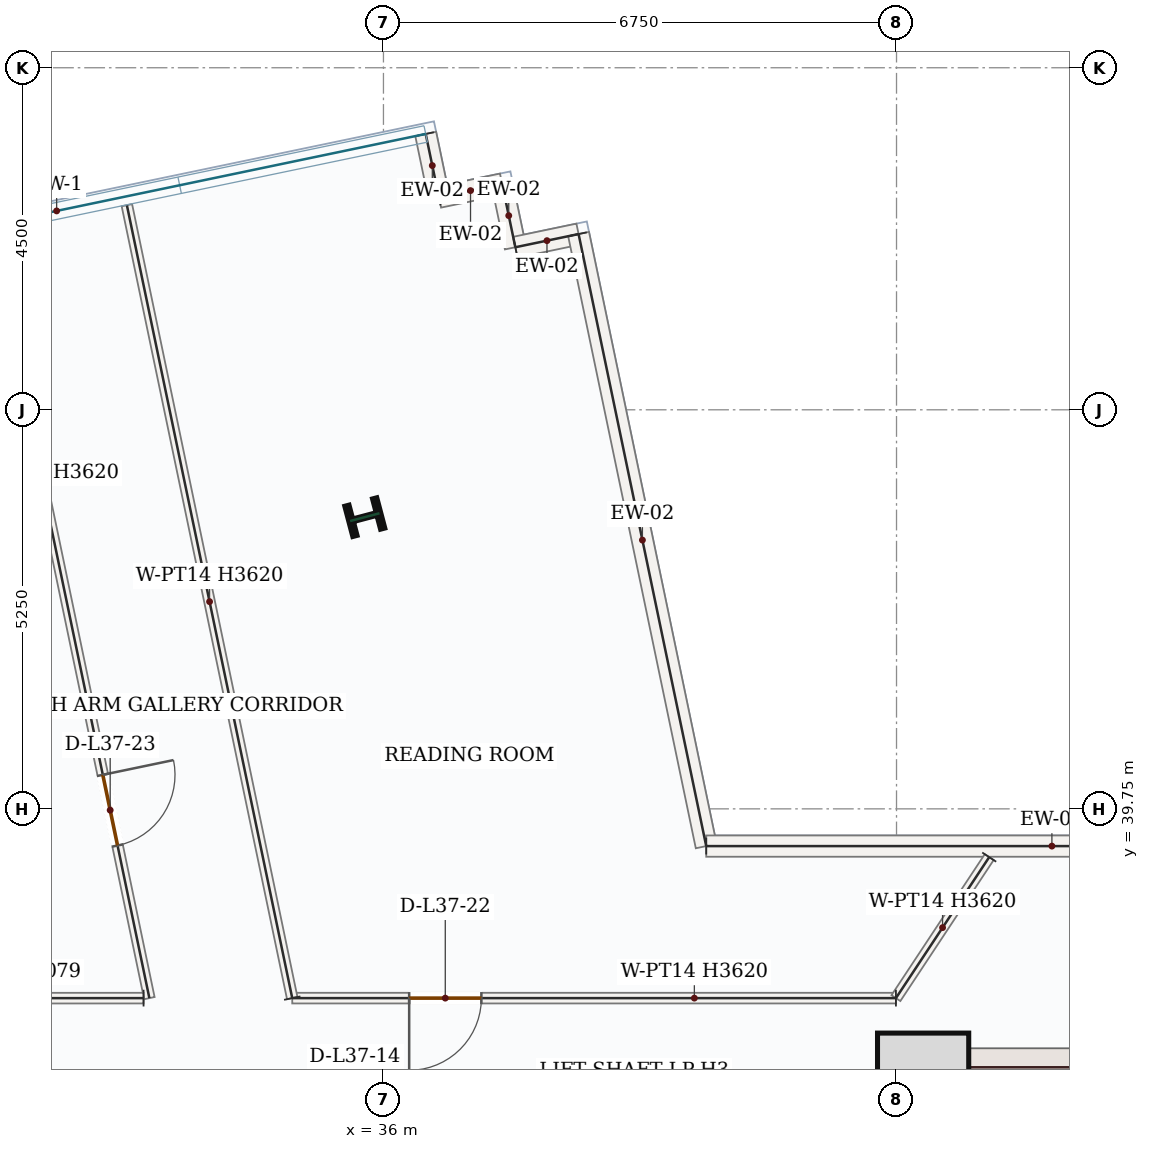
"""IFC4 building model, lengths in metres.
Left out: names, types, materials, properties, quantities, classifications, styles, units other than length and angle.
Written with IfcOpenShell. Run it as: python <this file> out.ifc"""

import sys

from ifc_helpers import new_model, si_unit, direction, frame, frame_2d, origin, origin_2d, place, context, subcontext, project, spatial, rectangle, i_section, extrude, source, transform, mapped, element, fill, save


model = new_model("IFC4")
c1 = context("Model", 3, precision=1e-05, world=origin(), true_north=direction((0.0, 1.0)))
c2 = subcontext(c1, "Body", "Model", "MODEL_VIEW")
j1 = project(units=[si_unit("LENGTHUNIT", "METRE"), si_unit("PLANEANGLEUNIT", "RADIAN")], contexts=[c1])
p1 = place(None, origin())
s1 = spatial("IfcSite", under=j1, at=p1, CompositionType="ELEMENT")
p2 = place(p1, origin())
s2 = spatial("IfcBuilding", under=s1, at=p2, CompositionType="ELEMENT")
p3 = place(p2, frame((0.0, 0.0, 162.9)))
s3 = spatial("IfcBuildingStorey", under=s2, at=p3, CompositionType="ELEMENT", Elevation=162.9)
p4 = place(p3, frame((43.0, 28.05, 0.0), z_axis=(0.0, 0.0, 1.0), x_axis=(0.0, 1.0, 0.0)))
e1 = element("IfcWall", 1, at=p4, inside=s3, PredefinedType="SHEAR", context=c2, shape_type="SweptSolid", body=[
    extrude(rectangle(XDim=8.55, YDim=0.5, at=frame_2d((4.275, 0.0))), origin(), (0.0, 0.0, 1.0), 3.62),
])
p5 = place(p4, frame((1.5, 0.0, 0.0)))
e2 = element("IfcOpeningElement", 2, at=p5, cuts=e1, PredefinedType="OPENING", context=c2, shape_type="SweptSolid", body=[
    extrude(rectangle(XDim=1.1, YDim=2.2, at=frame_2d((0.55, 1.1))), frame((0.0, 0.26, 0.0), z_axis=(0.0, -1.0, 0.0), x_axis=(1.0, 0.0, 0.0)), (0.0, 0.0, 1.0), 0.52),
])
m1 = source(origin(), c2, "Body", "SweptSolid", [
    extrude(rectangle(XDim=7.0, YDim=0.5, at=frame_2d((3.5, 0.0))), origin(), (0.0, 0.0, 1.0), 3.62),
])
p6 = place(p3, frame((43.25, 36.35, 0.0), z_axis=(0.0, 0.0, 1.0), x_axis=(1.0, 0.0, 0.0)))
e3 = element("IfcWall", 3, at=p6, inside=s3, PredefinedType="SHEAR", context=c2, shape_type="MappedRepresentation", body=[
    mapped(m1, transform((0.0, 0.0, 0.0), x_axis=(1.0, 0.0, 0.0), y_axis=(0.0, 1.0, 0.0), z_axis=(0.0, 0.0, 1.0), scale=1.0)),
])
m2 = source(origin(), c2, "Body", "SweptSolid", [
    extrude(rectangle(XDim=1.2, YDim=1.2, at=origin_2d()), origin(), (0.0, 0.0, 1.0), 3.9),
])
p7 = place(p3, frame((43.1, 36.2, 0.0), z_axis=(0.0, 0.0, 1.0), x_axis=(1.0, 0.0, 0.0)))
e4 = element("IfcColumn", 4, at=p7, inside=s3, PredefinedType="COLUMN", context=c2, shape_type="MappedRepresentation", body=[
    mapped(m2, transform((0.0, 0.0, 0.0), x_axis=(1.0, 0.0, 0.0), y_axis=(0.0, 1.0, 0.0), z_axis=(0.0, 0.0, 1.0), scale=1.0)),
])
m3 = source(origin(), c2, "Body", "SweptSolid", [
    extrude(i_section(OverallWidth=0.412, OverallDepth=0.435, WebThickness=0.036, FlangeThickness=0.057, FilletRadius=0.018, at=origin_2d()), origin(), (0.0, 0.0, 1.0), 3.9),
])
p8 = place(p3, frame((35.755, 43.588, 0.0), z_axis=(0.0, 0.0, 1.0), x_axis=(-0.255445757936, 0.966823388604, 0.0)))
e5 = element("IfcColumn", 5, at=p8, inside=s3, PredefinedType="COLUMN", context=c2, shape_type="MappedRepresentation", body=[
    mapped(m3, transform((0.0, 0.0, 0.0), x_axis=(1.0, 0.0, 0.0), y_axis=(0.0, 1.0, 0.0), z_axis=(0.0, 0.0, 1.0), scale=1.0)),
])
m4 = source(origin(), c2, "Body", "SweptSolid", [
    extrude(rectangle(XDim=0.85, YDim=0.28, at=frame_2d((0.425, 0.0))), origin(), (0.0, 0.0, 1.0), 3.62),
])
for number, where, z_axis, x_axis in (
    (6, (36.556, 48.629, 0.0), (0.0, 0.0, 1.0), (0.204, -0.979, 0.0)),
    (7, (36.729, 47.797, 0.0), (0.0, 0.0, 1.0), (0.979, 0.204, 0.0)),
    (8, (37.562, 47.97, 0.0), (0.0, 0.0, 1.0), (0.204, -0.979, 0.0)),
):
    element("IfcWall", number, at=place(p3, frame(where, z_axis=z_axis, x_axis=x_axis)), inside=s3, PredefinedType="SOLIDWALL", context=c2, shape_type="MappedRepresentation", body=[
        mapped(m4, transform((0.0, 0.0, 0.0), x_axis=(1.0, 0.0, 0.0), y_axis=(0.0, 1.0, 0.0), z_axis=(0.0, 0.0, 1.0), scale=1.0)),
    ])
m5 = source(origin(), c2, "Body", "SweptSolid", [
    extrude(rectangle(XDim=0.85, YDim=0.28, at=frame_2d((0.425, 0.0))), origin(), (0.0, 0.0, 1.0), 3.62),
])
p9 = place(p3, frame((37.735, 47.138, 0.0), z_axis=(0.0, 0.0, 1.0), x_axis=(0.97893500384, 0.204172128991, 0.0)))
e9 = element("IfcWall", 9, at=p9, inside=s3, PredefinedType="SOLIDWALL", context=c2, shape_type="MappedRepresentation", body=[
    mapped(m5, transform((0.0, 0.0, 0.0), x_axis=(1.0, 0.0, 0.0), y_axis=(0.0, 1.0, 0.0), z_axis=(0.0, 0.0, 1.0), scale=1.0)),
])
m6 = source(origin(), c2, "Body", "SweptSolid", [
    extrude(rectangle(XDim=8.225, YDim=0.28, at=frame_2d((4.113, 0.0))), origin(), (0.0, 0.0, 1.0), 3.62),
])
p10 = place(p3, frame((38.567, 47.312, 0.0), z_axis=(0.0, 0.0, 1.0), x_axis=(0.204152195211, -0.978939161128, 0.0)))
e10 = element("IfcWall", 10, at=p10, inside=s3, PredefinedType="SOLIDWALL", context=c2, shape_type="MappedRepresentation", body=[
    mapped(m6, transform((0.0, 0.0, 0.0), x_axis=(1.0, 0.0, 0.0), y_axis=(0.0, 1.0, 0.0), z_axis=(0.0, 0.0, 1.0), scale=1.0)),
])
m7 = source(origin(), c2, "Body", "SweptSolid", [
    extrude(rectangle(XDim=9.095, YDim=0.28, at=frame_2d((4.548, 0.0))), origin(), (0.0, 0.0, 1.0), 3.62),
])
p11 = place(p3, frame((40.247, 39.26, 0.0), z_axis=(0.0, 0.0, 1.0), x_axis=(1.0, 0.0, 0.0)))
e11 = element("IfcWall", 11, at=p11, inside=s3, PredefinedType="SOLIDWALL", context=c2, shape_type="MappedRepresentation", body=[
    mapped(m7, transform((0.0, 0.0, 0.0), x_axis=(1.0, 0.0, 0.0), y_axis=(0.0, 1.0, 0.0), z_axis=(0.0, 0.0, 1.0), scale=1.0)),
])
p12 = place(p3, frame((42.742, 37.26, 0.0), z_axis=(0.0, 0.0, 1.0), x_axis=(-1.0, 0.0, 0.0)))
e12 = element("IfcWall", 12, at=p12, inside=s3, PredefinedType="PARTITIONING", context=c2, shape_type="SweptSolid", body=[
    extrude(rectangle(XDim=7.942, YDim=0.14, at=frame_2d((3.971, 0.0))), origin(), (0.0, 0.0, 1.0), 3.62),
])
p13 = place(p12, frame((5.454, 0.0, 0.0)))
e13 = element("IfcOpeningElement", 13, at=p13, cuts=e12, PredefinedType="OPENING", context=c2, shape_type="SweptSolid", body=[
    extrude(rectangle(XDim=0.95, YDim=2.15, at=frame_2d((0.475, 1.075))), frame((0.0, 0.08, 0.0), z_axis=(0.0, -1.0, 0.0), x_axis=(1.0, 0.0, 0.0)), (0.0, 0.0, 1.0), 0.16),
])
m8 = source(origin(), c2, "Body", "SweptSolid", [
    extrude(rectangle(XDim=10.656, YDim=0.14, at=frame_2d((5.328, 0.0))), origin(), (0.0, 0.0, 1.0), 3.62),
])
p14 = place(p3, frame((34.8, 37.26, 0.0), z_axis=(0.0, 0.0, 1.0), x_axis=(-0.204159189901, 0.978937702399, 0.0)))
e14 = element("IfcWall", 14, at=p14, inside=s3, PredefinedType="PARTITIONING", context=c2, shape_type="MappedRepresentation", body=[
    mapped(m8, transform((0.0, 0.0, 0.0), x_axis=(1.0, 0.0, 0.0), y_axis=(0.0, 1.0, 0.0), z_axis=(0.0, 0.0, 1.0), scale=1.0)),
])
m9 = source(origin(), c2, "Body", "SweptSolid", [
    extrude(rectangle(XDim=2.224, YDim=0.14, at=frame_2d((1.112, 0.0))), origin(), (0.0, 0.0, 1.0), 3.62),
])
p15 = place(p3, frame((43.969, 39.115, 0.0), z_axis=(0.0, 0.0, 1.0), x_axis=(-0.551783828078, -0.833987174405, 0.0)))
e15 = element("IfcWall", 15, at=p15, inside=s3, PredefinedType="PARTITIONING", context=c2, shape_type="MappedRepresentation", body=[
    mapped(m9, transform((0.0, 0.0, 0.0), x_axis=(1.0, 0.0, 0.0), y_axis=(0.0, 1.0, 0.0), z_axis=(0.0, 0.0, 1.0), scale=1.0)),
])
p16 = place(p3, frame((30.823, 47.316, 0.0), z_axis=(0.0, 0.0, 1.0), x_axis=(0.204130779611, -0.978943626985, 0.0)))
e16 = element("IfcWall", 16, at=p16, inside=s3, PredefinedType="PARTITIONING", context=c2, shape_type="SweptSolid", body=[
    extrude(rectangle(XDim=10.272, YDim=0.14, at=frame_2d((5.136, 0.0))), origin(), (0.0, 0.0, 1.0), 3.62),
])
p17 = place(p16, frame((7.271, 0.0, 0.0)))
e17 = element("IfcOpeningElement", 17, at=p17, cuts=e16, PredefinedType="OPENING", context=c2, shape_type="SweptSolid", body=[
    extrude(rectangle(XDim=0.95, YDim=2.15, at=frame_2d((0.475, 1.075))), frame((0.0, 0.08, 0.0), z_axis=(0.0, -1.0, 0.0), x_axis=(1.0, 0.0, 0.0)), (0.0, 0.0, 1.0), 0.16),
])
m10 = source(origin(), c2, "Body", "SweptSolid", [
    extrude(rectangle(XDim=3.589, YDim=0.14, at=frame_2d((1.794, 0.0))), origin(), (0.0, 0.0, 1.0), 3.079),
])
p18 = place(p3, frame((32.844, 37.26, 0.0), z_axis=(0.0, 0.0, 1.0), x_axis=(-0.999999942162, -0.000340112898, 0.0)))
e18 = element("IfcWall", 18, at=p18, inside=s3, PredefinedType="PARTITIONING", context=c2, shape_type="MappedRepresentation", body=[
    mapped(m10, transform((0.0, 0.0, 0.0), x_axis=(1.0, 0.0, 0.0), y_axis=(0.0, 1.0, 0.0), z_axis=(0.0, 0.0, 1.0), scale=1.0)),
])
m11 = source(origin(), c2, "Body", "SweptSolid", [
    extrude(rectangle(XDim=0.95, YDim=2.15, at=frame_2d((0.475, 1.075))), frame((0.0, 0.025, 0.0), z_axis=(0.0, -1.0, 0.0), x_axis=(1.0, 0.0, 0.0)), (0.0, 0.0, 1.0), 0.05),
])
p19 = place(p13, origin())
e19 = element("IfcDoor", 19, at=p19, inside=s3, OperationType="SINGLE_SWING_RIGHT", PredefinedType="DOOR", context=c2, shape_type="MappedRepresentation", body=[
    mapped(m11, transform((0.0, 0.0, 0.0), x_axis=(1.0, 0.0, 0.0), y_axis=(0.0, 1.0, 0.0), z_axis=(0.0, 0.0, 1.0), scale=1.0)),
])
fill(e13, e19)
p20 = place(p17, origin())
e20 = element("IfcDoor", 20, at=p20, inside=s3, OperationType="SINGLE_SWING_LEFT", PredefinedType="DOOR", context=c2, shape_type="MappedRepresentation", body=[
    mapped(m11, transform((0.0, 0.0, 0.0), x_axis=(1.0, 0.0, 0.0), y_axis=(0.0, 1.0, 0.0), z_axis=(0.0, 0.0, 1.0), scale=1.0)),
])
fill(e17, e20)
save(model, sys.argv[1])
